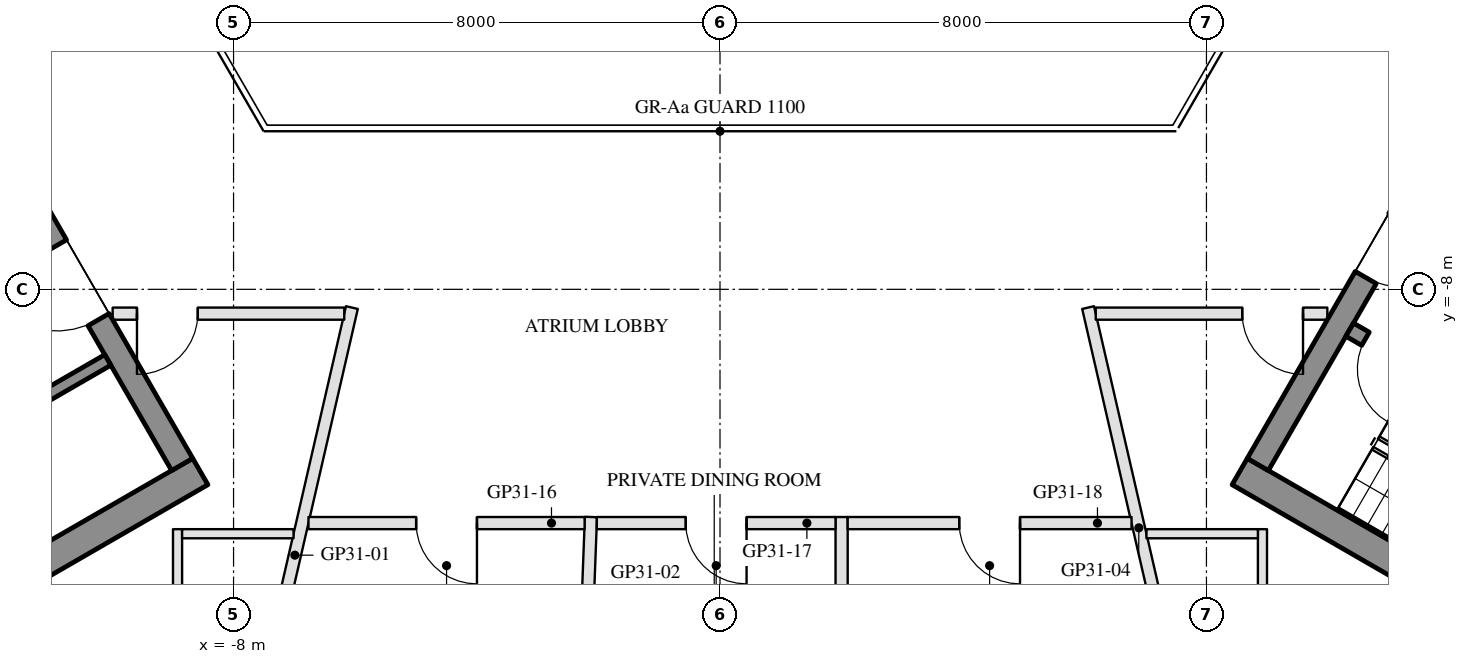
"""IFC4 building model, lengths in metres.
Left out: names, types, materials, properties, quantities, classifications, styles, units other than length and angle.
Written with IfcOpenShell. Run it as: python <this file> out.ifc"""

import sys

from ifc_helpers import new_model, si_unit, direction, frame, frame_2d, origin, place, context, subcontext, project, spatial, rectangle, extrude, element, fill, save


model = new_model("IFC4")
c1 = context("Model", 3, precision=1e-05, world=origin(), true_north=direction((0.0, 1.0)))
c2 = subcontext(c1, "Body", "Model", "MODEL_VIEW")
j1 = project(units=[si_unit("LENGTHUNIT", "METRE"), si_unit("PLANEANGLEUNIT", "RADIAN")], contexts=[c1])
p1 = place(None, origin())
s1 = spatial("IfcSite", under=j1, at=p1, CompositionType="ELEMENT")
p2 = place(p1, origin())
s2 = spatial("IfcBuilding", under=s1, at=p2, CompositionType="ELEMENT")
p3 = place(p2, frame((0.0, 0.0, 302.2)))
s3 = spatial("IfcBuildingStorey", under=s2, at=p3, CompositionType="ELEMENT", Elevation=302.2)
p4 = place(p3, frame((-8.547, -10.997, 0.0), z_axis=(0.0, 0.0, 1.0), x_axis=(-0.866027279078, -0.499996751883, 0.0)))
e1 = element("IfcWall", 1, at=p4, inside=s3, PredefinedType="SHEAR", context=c2, shape_type="SweptSolid", body=[
    extrude(rectangle(XDim=10.298, YDim=0.5, at=frame_2d((5.149, 0.0))), origin(), (0.0, 0.0, 1.0), 3.5),
])
p5 = place(p3, frame((-13.845, -2.22, 0.0), z_axis=(0.0, 0.0, 1.0), x_axis=(0.500004234368, -0.866022959057, 0.0)))
e2 = element("IfcWall", 2, at=p5, inside=s3, PredefinedType="SHEAR", context=c2, shape_type="SweptSolid", body=[
    extrude(rectangle(XDim=10.0, YDim=0.4, at=frame_2d((5.0, 0.0))), origin(), (0.0, 0.0, 1.0), 3.5),
])
p6 = place(p5, frame((3.55, 0.0, 0.0)))
e3 = element("IfcOpeningElement", 3, at=p6, cuts=e2, PredefinedType="OPENING", context=c2, shape_type="SweptSolid", body=[
    extrude(rectangle(XDim=1.1, YDim=2.1, at=frame_2d((0.55, 1.05))), frame((0.0, 0.21, 0.0), z_axis=(0.0, -1.0, 0.0), x_axis=(1.0, 0.0, 0.0)), (0.0, 0.0, 1.0), 0.42),
])
p7 = place(p5, frame((5.85, 0.0, 0.0)))
e4 = element("IfcOpeningElement", 4, at=p7, cuts=e2, PredefinedType="OPENING", context=c2, shape_type="SweptSolid", body=[
    extrude(rectangle(XDim=1.4, YDim=2.1, at=frame_2d((0.7, 1.05))), frame((0.0, 0.21, 0.0), z_axis=(0.0, -1.0, 0.0), x_axis=(1.0, 0.0, 0.0)), (0.0, 0.0, 1.0), 0.42),
])
p8 = place(p3, frame((-10.068, -9.162, 0.0), z_axis=(0.0, 0.0, 1.0), x_axis=(-0.866032725843, -0.499987317609, 0.0)))
e5 = element("IfcWall", 5, at=p8, inside=s3, PredefinedType="SHEAR", context=c2, shape_type="SweptSolid", body=[
    extrude(rectangle(XDim=10.16, YDim=0.2, at=frame_2d((5.08, 0.0))), origin(), (0.0, 0.0, 1.0), 3.5),
])
p9 = place(p8, frame((1.99, 0.0, 0.0)))
e6 = element("IfcOpeningElement", 6, at=p9, cuts=e5, PredefinedType="OPENING", context=c2, shape_type="SweptSolid", body=[
    extrude(rectangle(XDim=0.9, YDim=2.1, at=frame_2d((0.45, 1.05))), frame((0.0, 0.11, 0.0), z_axis=(0.0, -1.0, 0.0), x_axis=(1.0, 0.0, 0.0)), (0.0, 0.0, 1.0), 0.22),
])
p10 = place(p8, frame((7.07, 0.0, 0.0)))
e7 = element("IfcOpeningElement", 7, at=p10, cuts=e5, PredefinedType="OPENING", context=c2, shape_type="SweptSolid", body=[
    extrude(rectangle(XDim=0.9, YDim=2.1, at=frame_2d((0.45, 1.05))), frame((0.0, 0.11, 0.0), z_axis=(0.0, -1.0, 0.0), x_axis=(1.0, 0.0, 0.0)), (0.0, 0.0, 1.0), 0.22),
])
p11 = place(p3, frame((8.547, -10.997, 0.0), z_axis=(0.0, 0.0, 1.0), x_axis=(0.866027279078, -0.499996751883, 0.0)))
e8 = element("IfcWall", 8, at=p11, inside=s3, PredefinedType="SHEAR", context=c2, shape_type="SweptSolid", body=[
    extrude(rectangle(XDim=10.298, YDim=0.5, at=frame_2d((5.149, 0.0))), origin(), (0.0, 0.0, 1.0), 3.5),
])
p12 = place(p3, frame((8.845, -10.88, 0.0), z_axis=(0.0, 0.0, 1.0), x_axis=(0.500004234368, 0.866022959057, 0.0)))
e9 = element("IfcWall", 9, at=p12, inside=s3, PredefinedType="SHEAR", context=c2, shape_type="SweptSolid", body=[
    extrude(rectangle(XDim=10.0, YDim=0.4, at=frame_2d((5.0, 0.0))), origin(), (0.0, 0.0, 1.0), 3.5),
])
p13 = place(p12, frame((3.55, 0.0, 0.0)))
e10 = element("IfcOpeningElement", 10, at=p13, cuts=e9, PredefinedType="OPENING", context=c2, shape_type="SweptSolid", body=[
    extrude(rectangle(XDim=1.1, YDim=2.1, at=frame_2d((0.55, 1.05))), frame((0.0, 0.21, 0.0), z_axis=(0.0, -1.0, 0.0), x_axis=(1.0, 0.0, 0.0)), (0.0, 0.0, 1.0), 0.42),
])
p14 = place(p12, frame((5.85, 0.0, 0.0)))
e11 = element("IfcOpeningElement", 11, at=p14, cuts=e9, PredefinedType="OPENING", context=c2, shape_type="SweptSolid", body=[
    extrude(rectangle(XDim=1.4, YDim=2.1, at=frame_2d((0.7, 1.05))), frame((0.0, 0.21, 0.0), z_axis=(0.0, -1.0, 0.0), x_axis=(1.0, 0.0, 0.0)), (0.0, 0.0, 1.0), 0.42),
])
p15 = place(p3, frame((10.356, -8.664, 0.0), z_axis=(0.0, 0.0, 1.0), x_axis=(0.866028629588, -0.499994412703, 0.0)))
e12 = element("IfcWall", 12, at=p15, inside=s3, PredefinedType="SHEAR", context=c2, shape_type="SweptSolid", body=[
    extrude(rectangle(XDim=6.45, YDim=0.25, at=frame_2d((3.225, 0.0))), origin(), (0.0, 0.0, 1.0), 3.5),
])
p16 = place(p15, frame((0.3, 0.0, 0.0)))
e13 = element("IfcOpeningElement", 13, at=p16, cuts=e12, PredefinedType="OPENING", context=c2, shape_type="SweptSolid", body=[
    extrude(rectangle(XDim=1.0, YDim=2.1, at=frame_2d((0.5, 1.05))), frame((0.0, 0.135, 0.0), z_axis=(0.0, -1.0, 0.0), x_axis=(1.0, 0.0, 0.0)), (0.0, 0.0, 1.0), 0.27),
])
p17 = place(p3, frame((-7.93, -16.445, 0.0), z_axis=(0.0, 0.0, 1.0), x_axis=(0.224458408835, 0.974483669798, 0.0)))
e14 = element("IfcWall", 14, at=p17, inside=s3, PredefinedType="PARTITIONING", context=c2, shape_type="SweptSolid", body=[
    extrude(rectangle(XDim=8.358, YDim=0.2, at=frame_2d((4.179, 0.0))), origin(), (0.0, 0.0, 1.0), 3.1),
])
p18 = place(p3, frame((-2.266, -15.545, 0.0), z_axis=(0.0, 0.0, 1.0), x_axis=(0.037750136795, 0.999287209551, 0.0)))
e15 = element("IfcWall", 15, at=p18, inside=s3, PredefinedType="PARTITIONING", context=c2, shape_type="SweptSolid", body=[
    extrude(rectangle(XDim=3.803, YDim=0.2, at=frame_2d((1.901, 0.0))), origin(), (0.0, 0.0, 1.0), 3.16),
])
p19 = place(p3, frame((2.0, -16.445, 0.0), z_axis=(0.0, 0.0, 1.0), x_axis=(0.0, 1.0, 0.0)))
e16 = element("IfcWall", 16, at=p19, inside=s3, PredefinedType="PARTITIONING", context=c2, shape_type="SweptSolid", body=[
    extrude(rectangle(XDim=4.7, YDim=0.2, at=frame_2d((2.35, 0.0))), origin(), (0.0, 0.0, 1.0), 3.16),
])
p20 = place(p3, frame((7.723, -15.545, 0.0), z_axis=(0.0, 0.0, 1.0), x_axis=(-0.224458954761, 0.974483544052, 0.0)))
e17 = element("IfcWall", 17, at=p20, inside=s3, PredefinedType="PARTITIONING", context=c2, shape_type="SweptSolid", body=[
    extrude(rectangle(XDim=7.434, YDim=0.2, at=frame_2d((3.717, 0.0))), origin(), (0.0, 0.0, 1.0), 3.1),
])
p21 = place(p3, frame((-6.18, -8.4, 0.0), z_axis=(0.0, 0.0, 1.0), x_axis=(-1.0, 0.0, 0.0)))
e18 = element("IfcWall", 18, at=p21, inside=s3, PredefinedType="PARTITIONING", context=c2, shape_type="SweptSolid", body=[
    extrude(rectangle(XDim=3.809, YDim=0.2, at=frame_2d((1.904, 0.0))), origin(), (0.0, 0.0, 1.0), 3.1),
])
p22 = place(p21, frame((2.409, 0.0, 0.0)))
e19 = element("IfcOpeningElement", 19, at=p22, cuts=e18, PredefinedType="OPENING", context=c2, shape_type="SweptSolid", body=[
    extrude(rectangle(XDim=1.0, YDim=2.1, at=frame_2d((0.5, 1.05))), frame((0.0, 0.11, 0.0), z_axis=(0.0, -1.0, 0.0), x_axis=(1.0, 0.0, 0.0)), (0.0, 0.0, 1.0), 0.22),
])
p23 = place(p3, frame((-8.921, -11.945, 0.0), z_axis=(0.0, 0.0, 1.0), x_axis=(0.0, -1.0, 0.0)))
e20 = element("IfcWall", 20, at=p23, inside=s3, PredefinedType="PARTITIONING", context=c2, shape_type="SweptSolid", body=[
    extrude(rectangle(XDim=2.8, YDim=0.15, at=frame_2d((1.4, 0.0))), origin(), (0.0, 0.0, 1.0), 3.55),
])
p24 = place(p23, frame((1.4, 0.0, 0.0)))
e21 = element("IfcOpeningElement", 21, at=p24, cuts=e20, PredefinedType="OPENING", context=c2, shape_type="SweptSolid", body=[
    extrude(rectangle(XDim=0.9, YDim=2.1, at=frame_2d((0.45, 1.05))), frame((0.0, 0.085, 0.0), z_axis=(0.0, -1.0, 0.0), x_axis=(1.0, 0.0, 0.0)), (0.0, 0.0, 1.0), 0.17),
])
p25 = place(p3, frame((-8.846, -12.02, 0.0), z_axis=(0.0, 0.0, 1.0), x_axis=(1.0, 0.0, 0.0)))
e22 = element("IfcWall", 22, at=p25, inside=s3, PredefinedType="PARTITIONING", context=c2, shape_type="SweptSolid", body=[
    extrude(rectangle(XDim=1.833, YDim=0.15, at=frame_2d((0.917, 0.0))), origin(), (0.0, 0.0, 1.0), 3.55),
])
p26 = place(p3, frame((-2.226, -11.844, 0.0), z_axis=(0.0, 0.0, 1.0), x_axis=(-1.0, 0.0, 0.0)))
e23 = element("IfcWall", 23, at=p26, inside=s3, PredefinedType="PARTITIONING", context=c2, shape_type="SweptSolid", body=[
    extrude(rectangle(XDim=4.542, YDim=0.2, at=frame_2d((2.271, 0.0))), origin(), (0.0, 0.0, 1.0), 3.1),
])
p27 = place(p26, frame((1.771, 0.0, 0.0)))
e24 = element("IfcOpeningElement", 24, at=p27, cuts=e23, PredefinedType="OPENING", context=c2, shape_type="SweptSolid", body=[
    extrude(rectangle(XDim=1.0, YDim=2.1, at=frame_2d((0.5, 1.05))), frame((0.0, 0.11, 0.0), z_axis=(0.0, -1.0, 0.0), x_axis=(1.0, 0.0, 0.0)), (0.0, 0.0, 1.0), 0.22),
])
p28 = place(p3, frame((1.9, -11.844, 0.0), z_axis=(0.0, 0.0, 1.0), x_axis=(-1.0, 0.0, 0.0)))
e25 = element("IfcWall", 25, at=p28, inside=s3, PredefinedType="PARTITIONING", context=c2, shape_type="SweptSolid", body=[
    extrude(rectangle(XDim=3.926, YDim=0.2, at=frame_2d((1.963, 0.0))), origin(), (0.0, 0.0, 1.0), 3.1),
])
p29 = place(p28, frame((1.463, 0.0, 0.0)))
e26 = element("IfcOpeningElement", 26, at=p29, cuts=e25, PredefinedType="OPENING", context=c2, shape_type="SweptSolid", body=[
    extrude(rectangle(XDim=1.0, YDim=2.1, at=frame_2d((0.5, 1.05))), frame((0.0, 0.11, 0.0), z_axis=(0.0, -1.0, 0.0), x_axis=(1.0, 0.0, 0.0)), (0.0, 0.0, 1.0), 0.22),
])
p30 = place(p3, frame((6.768, -11.844, 0.0), z_axis=(0.0, 0.0, 1.0), x_axis=(-1.0, 0.0, 0.0)))
e27 = element("IfcWall", 27, at=p30, inside=s3, PredefinedType="PARTITIONING", context=c2, shape_type="SweptSolid", body=[
    extrude(rectangle(XDim=4.668, YDim=0.2, at=frame_2d((2.334, 0.0))), origin(), (0.0, 0.0, 1.0), 3.1),
])
p31 = place(p30, frame((1.834, 0.0, 0.0)))
e28 = element("IfcOpeningElement", 28, at=p31, cuts=e27, PredefinedType="OPENING", context=c2, shape_type="SweptSolid", body=[
    extrude(rectangle(XDim=1.0, YDim=2.1, at=frame_2d((0.5, 1.05))), frame((0.0, 0.11, 0.0), z_axis=(0.0, -1.0, 0.0), x_axis=(1.0, 0.0, 0.0)), (0.0, 0.0, 1.0), 0.22),
])
p32 = place(p3, frame((9.988, -8.4, 0.0), z_axis=(0.0, 0.0, 1.0), x_axis=(-1.0, 0.0, 0.0)))
e29 = element("IfcWall", 29, at=p32, inside=s3, PredefinedType="PARTITIONING", context=c2, shape_type="SweptSolid", body=[
    extrude(rectangle(XDim=3.809, YDim=0.2, at=frame_2d((1.904, 0.0))), origin(), (0.0, 0.0, 1.0), 3.1),
])
p33 = place(p32, frame((0.4, 0.0, 0.0)))
e30 = element("IfcOpeningElement", 30, at=p33, cuts=e29, PredefinedType="OPENING", context=c2, shape_type="SweptSolid", body=[
    extrude(rectangle(XDim=1.0, YDim=2.1, at=frame_2d((0.5, 1.05))), frame((0.0, 0.11, 0.0), z_axis=(0.0, -1.0, 0.0), x_axis=(1.0, 0.0, 0.0)), (0.0, 0.0, 1.0), 0.22),
])
p34 = place(p3, frame((8.921, -14.745, 0.0), z_axis=(0.0, 0.0, 1.0), x_axis=(0.0, 1.0, 0.0)))
e31 = element("IfcWall", 31, at=p34, inside=s3, PredefinedType="PARTITIONING", context=c2, shape_type="SweptSolid", body=[
    extrude(rectangle(XDim=2.8, YDim=0.15, at=frame_2d((1.4, 0.0))), origin(), (0.0, 0.0, 1.0), 3.55),
])
p35 = place(p34, frame((0.5, 0.0, 0.0)))
e32 = element("IfcOpeningElement", 32, at=p35, cuts=e31, PredefinedType="OPENING", context=c2, shape_type="SweptSolid", body=[
    extrude(rectangle(XDim=0.9, YDim=2.1, at=frame_2d((0.45, 1.05))), frame((0.0, 0.085, 0.0), z_axis=(0.0, -1.0, 0.0), x_axis=(1.0, 0.0, 0.0)), (0.0, 0.0, 1.0), 0.17),
])
p36 = place(p3, frame((7.013, -12.02, 0.0), z_axis=(0.0, 0.0, 1.0), x_axis=(1.0, 0.0, 0.0)))
e33 = element("IfcWall", 33, at=p36, inside=s3, PredefinedType="PARTITIONING", context=c2, shape_type="SweptSolid", body=[
    extrude(rectangle(XDim=1.833, YDim=0.15, at=frame_2d((0.917, 0.0))), origin(), (0.0, 0.0, 1.0), 3.55),
])
p37 = place(p3, frame((10.365, -1.152, 0.0), z_axis=(0.0, 0.0, 1.0), x_axis=(0.499999897272, -0.866025463095, 0.0)))
e34 = element("IfcWall", 34, at=p37, inside=s3, PredefinedType="PARTITIONING", context=c2, shape_type="SweptSolid", body=[
    extrude(rectangle(XDim=3.809, YDim=0.2, at=frame_2d((1.904, 0.0))), origin(), (0.0, 0.0, 1.0), 3.1),
])
p38 = place(p37, frame((2.409, 0.0, 0.0)))
e35 = element("IfcOpeningElement", 35, at=p38, cuts=e34, PredefinedType="OPENING", context=c2, shape_type="SweptSolid", body=[
    extrude(rectangle(XDim=1.0, YDim=2.1, at=frame_2d((0.5, 1.05))), frame((0.0, 0.11, 0.0), z_axis=(0.0, -1.0, 0.0), x_axis=(1.0, 0.0, 0.0)), (0.0, 0.0, 1.0), 0.22),
])
p39 = place(p3, frame((-12.269, -4.45, 0.0), z_axis=(0.0, 0.0, 1.0), x_axis=(0.50002670742, 0.866009983699, 0.0)))
e36 = element("IfcWall", 36, at=p39, inside=s3, PredefinedType="PARTITIONING", context=c2, shape_type="SweptSolid", body=[
    extrude(rectangle(XDim=5.788, YDim=0.2, at=frame_2d((2.894, 0.0))), origin(), (0.0, 0.0, 1.0), 3.1),
])
p40 = place(p39, frame((2.338, 0.0, 0.0)))
e37 = element("IfcOpeningElement", 37, at=p40, cuts=e36, PredefinedType="OPENING", context=c2, shape_type="SweptSolid", body=[
    extrude(rectangle(XDim=1.0, YDim=2.1, at=frame_2d((0.5, 1.05))), frame((0.0, 0.11, 0.0), z_axis=(0.0, -1.0, 0.0), x_axis=(1.0, 0.0, 0.0)), (0.0, 0.0, 1.0), 0.22),
])
p41 = place(p7, frame((1.4, 0.0, 0.0), z_axis=(0.0, 0.0, 1.0), x_axis=(-1.0, 0.0, 0.0)))
e38 = element("IfcDoor", 38, at=p41, inside=s3, OperationType="DOUBLE_DOOR_SINGLE_SWING", PredefinedType="DOOR", context=c2, shape_type="SweptSolid", body=[
    extrude(rectangle(XDim=1.4, YDim=2.1, at=frame_2d((0.7, 1.05))), frame((0.0, 0.025, 0.0), z_axis=(0.0, -1.0, 0.0), x_axis=(1.0, 0.0, 0.0)), (0.0, 0.0, 1.0), 0.05),
])
fill(e4, e38)
p42 = place(p13, frame((1.1, 0.0, 0.0), z_axis=(0.0, 0.0, 1.0), x_axis=(-1.0, 0.0, 0.0)))
e39 = element("IfcDoor", 39, at=p42, inside=s3, OperationType="SINGLE_SWING_LEFT", PredefinedType="DOOR", context=c2, shape_type="SweptSolid", body=[
    extrude(rectangle(XDim=1.1, YDim=2.1, at=frame_2d((0.55, 1.05))), frame((0.0, 0.025, 0.0), z_axis=(0.0, -1.0, 0.0), x_axis=(1.0, 0.0, 0.0)), (0.0, 0.0, 1.0), 0.05),
])
fill(e10, e39)
p43 = place(p16, frame((1.0, 0.0, 0.0), z_axis=(0.0, 0.0, 1.0), x_axis=(-1.0, 0.0, 0.0)))
e40 = element("IfcDoor", 40, at=p43, inside=s3, OperationType="SINGLE_SWING_LEFT", PredefinedType="DOOR", context=c2, shape_type="SweptSolid", body=[
    extrude(rectangle(XDim=1.0, YDim=2.1, at=frame_2d((0.5, 1.05))), frame((0.0, 0.025, 0.0), z_axis=(0.0, -1.0, 0.0), x_axis=(1.0, 0.0, 0.0)), (0.0, 0.0, 1.0), 0.05),
])
fill(e13, e40)
p44 = place(p22, origin())
e41 = element("IfcDoor", 41, at=p44, inside=s3, OperationType="SINGLE_SWING_RIGHT", PredefinedType="DOOR", context=c2, shape_type="SweptSolid", body=[
    extrude(rectangle(XDim=1.0, YDim=2.1, at=frame_2d((0.5, 1.05))), frame((0.0, 0.025, 0.0), z_axis=(0.0, -1.0, 0.0), x_axis=(1.0, 0.0, 0.0)), (0.0, 0.0, 1.0), 0.05),
])
fill(e19, e41)
p45 = place(p27, origin())
e42 = element("IfcDoor", 42, at=p45, inside=s3, OperationType="SINGLE_SWING_LEFT", PredefinedType="DOOR", context=c2, shape_type="SweptSolid", body=[
    extrude(rectangle(XDim=1.0, YDim=2.1, at=frame_2d((0.5, 1.05))), frame((0.0, 0.025, 0.0), z_axis=(0.0, -1.0, 0.0), x_axis=(1.0, 0.0, 0.0)), (0.0, 0.0, 1.0), 0.05),
])
fill(e24, e42)
p46 = place(p29, origin())
e43 = element("IfcDoor", 43, at=p46, inside=s3, OperationType="SINGLE_SWING_LEFT", PredefinedType="DOOR", context=c2, shape_type="SweptSolid", body=[
    extrude(rectangle(XDim=1.0, YDim=2.1, at=frame_2d((0.5, 1.05))), frame((0.0, 0.025, 0.0), z_axis=(0.0, -1.0, 0.0), x_axis=(1.0, 0.0, 0.0)), (0.0, 0.0, 1.0), 0.05),
])
fill(e26, e43)
p47 = place(p31, origin())
e44 = element("IfcDoor", 44, at=p47, inside=s3, OperationType="SINGLE_SWING_LEFT", PredefinedType="DOOR", context=c2, shape_type="SweptSolid", body=[
    extrude(rectangle(XDim=1.0, YDim=2.1, at=frame_2d((0.5, 1.05))), frame((0.0, 0.025, 0.0), z_axis=(0.0, -1.0, 0.0), x_axis=(1.0, 0.0, 0.0)), (0.0, 0.0, 1.0), 0.05),
])
fill(e28, e44)
p48 = place(p33, origin())
e45 = element("IfcDoor", 45, at=p48, inside=s3, OperationType="SINGLE_SWING_LEFT", PredefinedType="DOOR", context=c2, shape_type="SweptSolid", body=[
    extrude(rectangle(XDim=1.0, YDim=2.1, at=frame_2d((0.5, 1.05))), frame((0.0, 0.025, 0.0), z_axis=(0.0, -1.0, 0.0), x_axis=(1.0, 0.0, 0.0)), (0.0, 0.0, 1.0), 0.05),
])
fill(e30, e45)
save(model, sys.argv[1])
